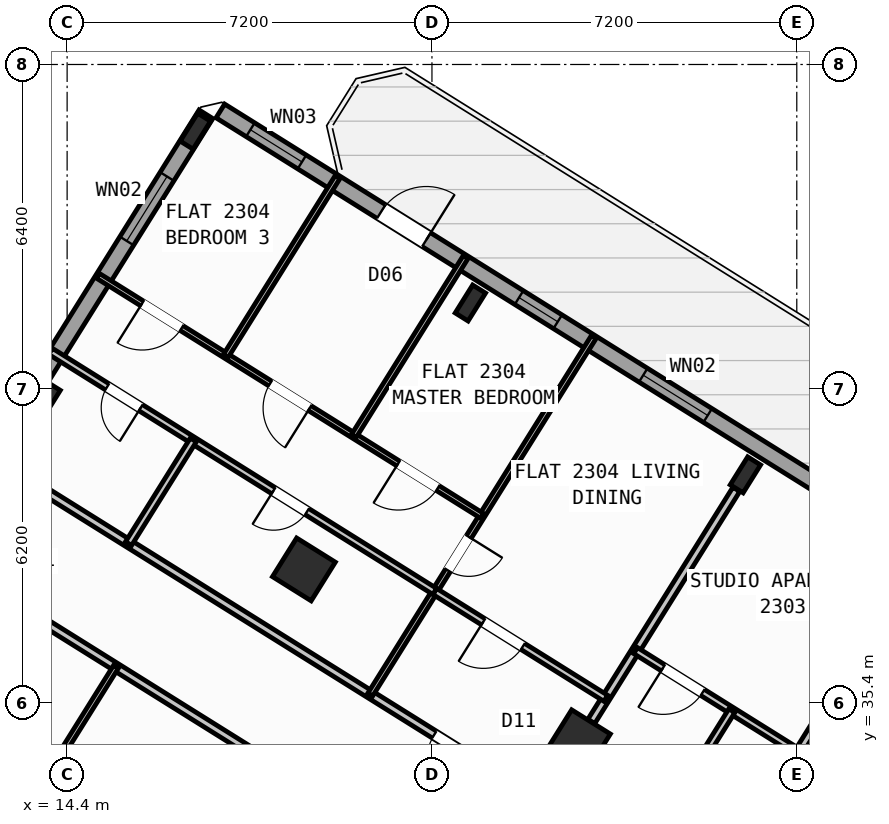
"""IFC4 building model, lengths in metres.
Left out: names, types, materials, properties, quantities, classifications, styles, units other than length and angle.
Written with IfcOpenShell. Run it as: python <this file> out.ifc"""

import sys

from ifc_helpers import new_model, si_unit, direction, frame, frame_2d, origin, origin_2d, place, context, subcontext, project, spatial, rectangle, hollow_rectangle, i_section, extrude, source, transform, mapped, element, fill, save


model = new_model("IFC4")
c1 = context("Model", 3, precision=1e-05, world=origin(), true_north=direction((0.0, 1.0)))
c2 = subcontext(c1, "Body", "Model", "MODEL_VIEW")
j1 = project(units=[si_unit("LENGTHUNIT", "METRE"), si_unit("PLANEANGLEUNIT", "RADIAN")], contexts=[c1])
p1 = place(None, origin())
s1 = spatial("IfcSite", under=j1, at=p1, CompositionType="ELEMENT")
p2 = place(p1, origin())
s2 = spatial("IfcBuilding", under=s1, at=p2, CompositionType="ELEMENT")
p3 = place(p2, frame((0.0, 0.0, 93.6)))
s3 = spatial("IfcBuildingStorey", under=s2, at=p3, CompositionType="ELEMENT", Elevation=93.6)
m1 = source(origin(), c2, "Body", "SweptSolid", [
    extrude(i_section(OverallWidth=0.3, OverallDepth=0.65, WebThickness=0.016, FlangeThickness=0.031, at=origin_2d()), origin(), (0.0, 0.0, 1.0), 3.6),
])
p4 = place(p3, frame((27.786, 39.901, 0.0), z_axis=(0.0, 0.0, 1.0), x_axis=(-0.848048096156, 0.529919264233, 0.0)))
e1 = element("IfcColumn", 1, at=p4, inside=s3, PredefinedType="COLUMN", context=c2, shape_type="MappedRepresentation", body=[
    mapped(m1, transform((0.0, 0.0, 0.0), scale=1.0)),
])
m2 = source(origin(), c2, "Body", "SweptSolid", [
    extrude(hollow_rectangle(XDim=0.9, YDim=0.9, WallThickness=0.036, at=origin_2d()), origin(), (0.0, 0.0, 1.0), 3.6),
])
p5 = place(p3, frame((24.5, 34.643, 0.0), z_axis=(0.0, 0.0, 1.0), x_axis=(-0.848048096156, 0.529919264233, 0.0)))
e2 = element("IfcColumn", 2, at=p5, inside=s3, PredefinedType="COLUMN", context=c2, shape_type="MappedRepresentation", body=[
    mapped(m2, transform((0.0, 0.0, 0.0), scale=1.0)),
])
p6 = place(p3, frame((22.358, 43.292, 0.0), z_axis=(0.0, 0.0, 1.0), x_axis=(-0.848048096156, 0.529919264233, 0.0)))
e3 = element("IfcColumn", 3, at=p6, inside=s3, PredefinedType="COLUMN", context=c2, shape_type="MappedRepresentation", body=[
    mapped(m1, transform((0.0, 0.0, 0.0), scale=1.0)),
])
p7 = place(p3, frame((19.073, 38.034, 0.0), z_axis=(0.0, 0.0, 1.0), x_axis=(-0.848048096156, 0.529919264233, 0.0)))
e4 = element("IfcColumn", 4, at=p7, inside=s3, PredefinedType="COLUMN", context=c2, shape_type="MappedRepresentation", body=[
    mapped(m2, transform((0.0, 0.0, 0.0), scale=1.0)),
])
p8 = place(p3, frame((16.931, 46.684, 0.0), z_axis=(0.0, 0.0, 1.0), x_axis=(-0.848048096156, 0.529919264233, 0.0)))
e5 = element("IfcColumn", 5, at=p8, inside=s3, PredefinedType="COLUMN", context=c2, shape_type="MappedRepresentation", body=[
    mapped(m1, transform((0.0, 0.0, 0.0), scale=1.0)),
])
p9 = place(p3, frame((13.646, 41.426, 0.0), z_axis=(0.0, 0.0, 1.0), x_axis=(-0.848048096156, 0.529919264233, 0.0)))
e6 = element("IfcColumn", 6, at=p9, inside=s3, PredefinedType="COLUMN", context=c2, shape_type="MappedRepresentation", body=[
    mapped(m2, transform((0.0, 0.0, 0.0), scale=1.0)),
])
p10 = place(p3, frame((5.7, 28.71, 0.0), z_axis=(0.0, 0.0, 1.0), x_axis=(0.529923711467, 0.8480453172, 0.0)))
e7 = element("IfcWall", 7, at=p10, inside=s3, PredefinedType="STANDARD", context=c2, shape_type="SweptSolid", body=[
    extrude(rectangle(XDim=21.587, YDim=0.32, at=frame_2d((10.794, 0.0))), origin(), (0.0, 0.0, 1.0), 2.775),
])
p11 = place(p10, frame((2.994, 0.0, 0.8)))
e8 = element("IfcOpeningElement", 8, at=p11, cuts=e7, PredefinedType="OPENING", context=c2, shape_type="SweptSolid", body=[
    extrude(rectangle(XDim=2.1, YDim=1.55, at=frame_2d((1.05, 0.775))), frame((0.0, 0.17, 0.0), z_axis=(0.0, -1.0, 0.0), x_axis=(1.0, 0.0, 0.0)), (0.0, 0.0, 1.0), 0.34),
])
p12 = place(p10, frame((9.739, 0.0, 1.0)))
e9 = element("IfcOpeningElement", 9, at=p12, cuts=e7, PredefinedType="OPENING", context=c2, shape_type="SweptSolid", body=[
    extrude(rectangle(XDim=0.9, YDim=1.25, at=frame_2d((0.45, 0.625))), frame((0.0, 0.17, 0.0), z_axis=(0.0, -1.0, 0.0), x_axis=(1.0, 0.0, 0.0)), (0.0, 0.0, 1.0), 0.34),
])
p13 = place(p10, frame((18.639, 0.0, 0.85)))
e10 = element("IfcOpeningElement", 10, at=p13, cuts=e7, PredefinedType="OPENING", context=c2, shape_type="SweptSolid", body=[
    extrude(rectangle(XDim=1.5, YDim=1.5, at=frame_2d((0.75, 0.75))), frame((0.0, 0.17, 0.0), z_axis=(0.0, -1.0, 0.0), x_axis=(1.0, 0.0, 0.0)), (0.0, 0.0, 1.0), 0.34),
])
p14 = place(p3, frame((17.424, 47.083, 0.0), z_axis=(0.0, 0.0, 1.0), x_axis=(0.848049927979, -0.529916332693, 0.0)))
e11 = element("IfcWall", 11, at=p14, inside=s3, PredefinedType="STANDARD", context=c2, shape_type="SweptSolid", body=[
    extrude(rectangle(XDim=29.223, YDim=0.32, at=frame_2d((14.612, 0.0))), origin(), (0.0, 0.0, 1.0), 3.35),
])
p15 = place(p14, frame((3.745, 0.0, 0.0)))
e12 = element("IfcOpeningElement", 12, at=p15, cuts=e11, PredefinedType="OPENING", context=c2, shape_type="SweptSolid", body=[
    extrude(rectangle(XDim=1.05, YDim=2.15, at=frame_2d((0.525, 1.075))), frame((0.0, 0.17, 0.0), z_axis=(0.0, -1.0, 0.0), x_axis=(1.0, 0.0, 0.0)), (0.0, 0.0, 1.0), 0.34),
])
p16 = place(p14, frame((0.699, 0.0, 0.95)))
e13 = element("IfcOpeningElement", 13, at=p16, cuts=e11, PredefinedType="OPENING", context=c2, shape_type="SweptSolid", body=[
    extrude(rectangle(XDim=1.2, YDim=1.4, at=frame_2d((0.6, 0.7))), frame((0.0, 0.17, 0.0), z_axis=(0.0, -1.0, 0.0), x_axis=(1.0, 0.0, 0.0)), (0.0, 0.0, 1.0), 0.34),
])
p17 = place(p14, frame((6.951, 0.0, 1.0)))
e14 = element("IfcOpeningElement", 14, at=p17, cuts=e11, PredefinedType="OPENING", context=c2, shape_type="SweptSolid", body=[
    extrude(rectangle(XDim=0.9, YDim=1.25, at=frame_2d((0.45, 0.625))), frame((0.0, 0.17, 0.0), z_axis=(0.0, -1.0, 0.0), x_axis=(1.0, 0.0, 0.0)), (0.0, 0.0, 1.0), 0.34),
])
p18 = place(p14, frame((9.841, 0.0, 0.85)))
e15 = element("IfcOpeningElement", 15, at=p18, cuts=e11, PredefinedType="OPENING", context=c2, shape_type="SweptSolid", body=[
    extrude(rectangle(XDim=1.5, YDim=1.5, at=frame_2d((0.75, 0.75))), frame((0.0, 0.17, 0.0), z_axis=(0.0, -1.0, 0.0), x_axis=(1.0, 0.0, 0.0)), (0.0, 0.0, 1.0), 0.34),
])
p19 = place(p14, frame((13.889, 0.0, 0.95)))
e16 = element("IfcOpeningElement", 16, at=p19, cuts=e11, PredefinedType="OPENING", context=c2, shape_type="SweptSolid", body=[
    extrude(rectangle(XDim=1.2, YDim=1.4, at=frame_2d((0.6, 0.7))), frame((0.0, 0.17, 0.0), z_axis=(0.0, -1.0, 0.0), x_axis=(1.0, 0.0, 0.0)), (0.0, 0.0, 1.0), 0.34),
])
p20 = place(p14, frame((17.254, 0.0, 1.0)))
e17 = element("IfcOpeningElement", 17, at=p20, cuts=e11, PredefinedType="OPENING", context=c2, shape_type="SweptSolid", body=[
    extrude(rectangle(XDim=0.9, YDim=1.25, at=frame_2d((0.45, 0.625))), frame((0.0, 0.17, 0.0), z_axis=(0.0, -1.0, 0.0), x_axis=(1.0, 0.0, 0.0)), (0.0, 0.0, 1.0), 0.34),
])
p21 = place(p14, frame((20.764, 0.0, 0.8)))
e18 = element("IfcOpeningElement", 18, at=p21, cuts=e11, PredefinedType="OPENING", context=c2, shape_type="SweptSolid", body=[
    extrude(rectangle(XDim=2.1, YDim=1.55, at=frame_2d((1.05, 0.775))), frame((0.0, 0.17, 0.0), z_axis=(0.0, -1.0, 0.0), x_axis=(1.0, 0.0, 0.0)), (0.0, 0.0, 1.0), 0.34),
])
p22 = place(p14, frame((25.403, 0.0, 0.8)))
e19 = element("IfcOpeningElement", 19, at=p22, cuts=e11, PredefinedType="OPENING", context=c2, shape_type="SweptSolid", body=[
    extrude(rectangle(XDim=2.1, YDim=1.55, at=frame_2d((1.05, 0.775))), frame((0.0, 0.17, 0.0), z_axis=(0.0, -1.0, 0.0), x_axis=(1.0, 0.0, 0.0)), (0.0, 0.0, 1.0), 0.34),
])
p23 = place(p3, frame((31.239, 38.274, 0.0), z_axis=(0.0, 0.0, 1.0), x_axis=(-0.529928058306, -0.848042600947, 0.0)))
e20 = element("IfcWall", 20, at=p23, inside=s3, PredefinedType="PARTITIONING", context=c2, shape_type="SweptSolid", body=[
    extrude(rectangle(XDim=8.05, YDim=0.16, at=frame_2d((4.025, 0.0))), origin(), (0.0, 0.0, 1.0), 3.34),
])
p24 = place(p3, frame((26.973, 31.447, 0.0), z_axis=(0.0, 0.0, 1.0), x_axis=(-0.848048310262, 0.529918921593, 0.0)))
e21 = element("IfcWall", 21, at=p24, inside=s3, PredefinedType="PARTITIONING", context=c2, shape_type="SweptSolid", body=[
    extrude(rectangle(XDim=16.73, YDim=0.16, at=frame_2d((8.365, 0.0))), origin(), (0.0, 0.0, 1.0), 3.34),
])
p25 = place(p24, frame((2.22, 0.0, 0.0)))
e22 = element("IfcOpeningElement", 22, at=p25, cuts=e21, PredefinedType="OPENING", context=c2, shape_type="SweptSolid", body=[
    extrude(rectangle(XDim=0.86, YDim=2.05, at=frame_2d((0.43, 1.025))), frame((0.0, 0.09, 0.0), z_axis=(0.0, -1.0, 0.0), x_axis=(1.0, 0.0, 0.0)), (0.0, 0.0, 1.0), 0.18),
])
p26 = place(p24, frame((5.28, 0.0, 0.0)))
e23 = element("IfcOpeningElement", 23, at=p26, cuts=e21, PredefinedType="OPENING", context=c2, shape_type="SweptSolid", body=[
    extrude(rectangle(XDim=1.0, YDim=2.1, at=frame_2d((0.5, 1.05))), frame((0.0, 0.09, 0.0), z_axis=(0.0, -1.0, 0.0), x_axis=(1.0, 0.0, 0.0)), (0.0, 0.0, 1.0), 0.18),
])
p27 = place(p3, frame((25.807, 29.582, 0.0), z_axis=(0.0, 0.0, 1.0), x_axis=(-0.848052408131, 0.529912363569, 0.0)))
e24 = element("IfcWall", 24, at=p27, inside=s3, PredefinedType="PARTITIONING", context=c2, shape_type="SweptSolid", body=[
    extrude(rectangle(XDim=16.73, YDim=0.16, at=frame_2d((8.365, 0.0))), origin(), (0.0, 0.0, 1.0), 3.34),
])
p28 = place(p27, frame((2.22, 0.0, 0.0)))
e25 = element("IfcOpeningElement", 25, at=p28, cuts=e24, PredefinedType="OPENING", context=c2, shape_type="SweptSolid", body=[
    extrude(rectangle(XDim=0.86, YDim=2.05, at=frame_2d((0.43, 1.025))), frame((0.0, 0.09, 0.0), z_axis=(0.0, -1.0, 0.0), x_axis=(1.0, 0.0, 0.0)), (0.0, 0.0, 1.0), 0.18),
])
p29 = place(p27, frame((14.013, 0.0, 0.0)))
e26 = element("IfcOpeningElement", 26, at=p29, cuts=e24, PredefinedType="OPENING", context=c2, shape_type="SweptSolid", body=[
    extrude(rectangle(XDim=1.0, YDim=2.1, at=frame_2d((0.5, 1.05))), frame((0.0, 0.09, 0.0), z_axis=(0.0, -1.0, 0.0), x_axis=(1.0, 0.0, 0.0)), (0.0, 0.0, 1.0), 0.18),
])
p30 = place(p3, frame((15.361, 36.108, 0.0), z_axis=(0.0, 0.0, 1.0), x_axis=(-0.529912802348, -0.848052133956, 0.0)))
e27 = element("IfcWall", 27, at=p30, inside=s3, PredefinedType="PARTITIONING", context=c2, shape_type="SweptSolid", body=[
    extrude(rectangle(XDim=11.72, YDim=0.11, at=frame_2d((5.86, 0.0))), origin(), (0.0, 0.0, 1.0), 2.995),
])
p31 = place(p30, frame((3.0, 0.0, 0.0)))
e28 = element("IfcOpeningElement", 28, at=p31, cuts=e27, PredefinedType="OPENING", context=c2, shape_type="SweptSolid", body=[
    extrude(rectangle(XDim=0.78, YDim=2.05, at=frame_2d((0.39, 1.025))), frame((0.0, 0.065, 0.0), z_axis=(0.0, -1.0, 0.0), x_axis=(1.0, 0.0, 0.0)), (0.0, 0.0, 1.0), 0.13),
])
p32 = place(p3, frame((14.09, 34.073, 0.0), z_axis=(0.0, 0.0, 1.0), x_axis=(-0.848045135007, 0.529924003034, 0.0)))
e29 = element("IfcWall", 29, at=p32, inside=s3, PredefinedType="PLUMBINGWALL", context=c2, shape_type="SweptSolid", body=[
    extrude(rectangle(XDim=4.393, YDim=0.14, at=frame_2d((2.196, 0.0))), origin(), (0.0, 0.0, 1.0), 3.34),
])
p33 = place(p32, frame((1.737, 0.0, 0.0)))
e30 = element("IfcOpeningElement", 30, at=p33, cuts=e29, PredefinedType="OPENING", context=c2, shape_type="SweptSolid", body=[
    extrude(rectangle(XDim=0.92, YDim=2.08, at=frame_2d((0.46, 1.04))), frame((0.0, 0.08, 0.0), z_axis=(0.0, -1.0, 0.0), x_axis=(1.0, 0.0, 0.0)), (0.0, 0.0, 1.0), 0.16),
])
p34 = place(p3, frame((27.607, 39.615, 0.0), z_axis=(0.0, 0.0, 1.0), x_axis=(-0.529913610495, -0.848051628978, 0.0)))
e31 = element("IfcWall", 31, at=p34, inside=s3, PredefinedType="PARTITIONING", context=c2, shape_type="SweptSolid", body=[
    extrude(rectangle(XDim=5.401, YDim=0.16, at=frame_2d((2.7, 0.0))), origin(), (0.0, 0.0, 1.0), 2.775),
])
p35 = place(p3, frame((28.833, 34.424, 0.0), z_axis=(0.0, 0.0, 1.0), x_axis=(-0.848059820872, 0.529900500304, 0.0)))
e32 = element("IfcWall", 32, at=p35, inside=s3, PredefinedType="PLUMBINGWALL", context=c2, shape_type="SweptSolid", body=[
    extrude(rectangle(XDim=3.79, YDim=0.14, at=frame_2d((1.895, 0.0))), origin(), (0.0, 0.0, 1.0), 3.34),
])
p36 = place(p35, frame((2.23, 0.0, 0.0)))
e33 = element("IfcOpeningElement", 33, at=p36, cuts=e32, PredefinedType="OPENING", context=c2, shape_type="SweptSolid", body=[
    extrude(rectangle(XDim=0.92, YDim=2.08, at=frame_2d((0.46, 1.04))), frame((0.0, 0.08, 0.0), z_axis=(0.0, -1.0, 0.0), x_axis=(1.0, 0.0, 0.0)), (0.0, 0.0, 1.0), 0.16),
])
p37 = place(p3, frame((27.518, 35.245, 0.0), z_axis=(0.0, 0.0, 1.0), x_axis=(-0.529948921118, -0.848029563757, 0.0)))
e34 = element("IfcWall", 34, at=p37, inside=s3, PredefinedType="PLUMBINGWALL", context=c2, shape_type="SweptSolid", body=[
    extrude(rectangle(XDim=3.51, YDim=0.14, at=frame_2d((1.755, 0.0))), origin(), (0.0, 0.0, 1.0), 2.995),
])
p38 = place(p37, frame((1.365, 0.0, 0.0)))
e35 = element("IfcOpeningElement", 35, at=p38, cuts=e34, PredefinedType="OPENING", context=c2, shape_type="SweptSolid", body=[
    extrude(rectangle(XDim=0.78, YDim=2.05, at=frame_2d((0.39, 1.025))), frame((0.0, 0.08, 0.0), z_axis=(0.0, -1.0, 0.0), x_axis=(1.0, 0.0, 0.0)), (0.0, 0.0, 1.0), 0.16),
])
p39 = place(p3, frame((24.792, 42.62, 0.0), z_axis=(0.0, 0.0, 1.0), x_axis=(-0.529925083182, -0.848044460046, 0.0)))
e36 = element("IfcWall", 36, at=p39, inside=s3, PredefinedType="PARTITIONING", context=c2, shape_type="SweptSolid", body=[
    extrude(rectangle(XDim=8.32, YDim=0.11, at=frame_2d((4.16, 0.0))), origin(), (0.0, 0.0, 1.0), 3.34),
])
p40 = place(p39, frame((4.65, 0.0, 0.0)))
e37 = element("IfcOpeningElement", 37, at=p40, cuts=e36, PredefinedType="OPENING", context=c2, shape_type="SweptSolid", body=[
    extrude(rectangle(XDim=0.78, YDim=2.05, at=frame_2d((0.39, 1.025))), frame((0.0, 0.065, 0.0), z_axis=(0.0, -1.0, 0.0), x_axis=(1.0, 0.0, 0.0)), (0.0, 0.0, 1.0), 0.13),
])
p41 = place(p3, frame((25.03, 35.491, 0.0), z_axis=(0.0, 0.0, 1.0), x_axis=(-0.848070667369, 0.52988314103, 0.0)))
e38 = element("IfcWall", 38, at=p41, inside=s3, PredefinedType="PLUMBINGWALL", context=c2, shape_type="SweptSolid", body=[
    extrude(rectangle(XDim=3.98, YDim=0.14, at=frame_2d((1.99, 0.0))), origin(), (0.0, 0.0, 1.0), 3.34),
])
p42 = place(p41, frame((1.93, 0.0, 0.0)))
e39 = element("IfcOpeningElement", 39, at=p42, cuts=e38, PredefinedType="OPENING", context=c2, shape_type="SweptSolid", body=[
    extrude(rectangle(XDim=0.92, YDim=2.08, at=frame_2d((0.46, 1.04))), frame((0.0, 0.08, 0.0), z_axis=(0.0, -1.0, 0.0), x_axis=(1.0, 0.0, 0.0)), (0.0, 0.0, 1.0), 0.16),
])
p43 = place(p3, frame((21.655, 37.6, 0.0), z_axis=(0.0, 0.0, 1.0), x_axis=(-0.848044326704, 0.52992529657, 0.0)))
e40 = element("IfcWall", 40, at=p43, inside=s3, PredefinedType="PLUMBINGWALL", context=c2, shape_type="SweptSolid", body=[
    extrude(rectangle(XDim=8.94, YDim=0.14, at=frame_2d((4.47, 0.0))), origin(), (0.0, 0.0, 1.0), 3.34),
])
p44 = place(p43, frame((2.972, 0.0, 0.0)))
e41 = element("IfcOpeningElement", 41, at=p44, cuts=e40, PredefinedType="OPENING", context=c2, shape_type="SweptSolid", body=[
    extrude(rectangle(XDim=0.78, YDim=2.05, at=frame_2d((0.39, 1.025))), frame((0.0, 0.08, 0.0), z_axis=(0.0, -1.0, 0.0), x_axis=(1.0, 0.0, 0.0)), (0.0, 0.0, 1.0), 0.16),
])
p45 = place(p43, frame((6.843, 0.0, 0.0)))
e42 = element("IfcOpeningElement", 42, at=p45, cuts=e40, PredefinedType="OPENING", context=c2, shape_type="SweptSolid", body=[
    extrude(rectangle(XDim=0.78, YDim=2.05, at=frame_2d((0.39, 1.025))), frame((0.0, 0.08, 0.0), z_axis=(0.0, -1.0, 0.0), x_axis=(1.0, 0.0, 0.0)), (0.0, 0.0, 1.0), 0.16),
])
p46 = place(p3, frame((16.89, 40.589, 0.0), z_axis=(0.0, 0.0, 1.0), x_axis=(-0.52988967038, -0.848066587731, 0.0)))
e43 = element("IfcWall", 43, at=p46, inside=s3, PredefinedType="PLUMBINGWALL", context=c2, shape_type="SweptSolid", body=[
    extrude(rectangle(XDim=2.41, YDim=0.14, at=frame_2d((1.205, 0.0))), origin(), (0.0, 0.0, 1.0), 3.34),
])
p47 = place(p3, frame((22.588, 39.093, 0.0), z_axis=(0.0, 0.0, 1.0), x_axis=(-0.848044326704, 0.52992529657, 0.0)))
e44 = element("IfcWall", 44, at=p47, inside=s3, PredefinedType="PARTITIONING", context=c2, shape_type="SweptSolid", body=[
    extrude(rectangle(XDim=8.94, YDim=0.11, at=frame_2d((4.47, 0.0))), origin(), (0.0, 0.0, 1.0), 3.34),
])
p48 = place(p47, frame((1.03, 0.0, 0.0)))
e45 = element("IfcOpeningElement", 45, at=p48, cuts=e44, PredefinedType="OPENING", context=c2, shape_type="SweptSolid", body=[
    extrude(rectangle(XDim=0.92, YDim=2.08, at=frame_2d((0.46, 1.04))), frame((0.0, 0.065, 0.0), z_axis=(0.0, -1.0, 0.0), x_axis=(1.0, 0.0, 0.0)), (0.0, 0.0, 1.0), 0.13),
])
p49 = place(p47, frame((4.01, 0.0, 0.0)))
e46 = element("IfcOpeningElement", 46, at=p49, cuts=e44, PredefinedType="OPENING", context=c2, shape_type="SweptSolid", body=[
    extrude(rectangle(XDim=0.92, YDim=2.08, at=frame_2d((0.46, 1.04))), frame((0.0, 0.065, 0.0), z_axis=(0.0, -1.0, 0.0), x_axis=(1.0, 0.0, 0.0)), (0.0, 0.0, 1.0), 0.13),
])
p50 = place(p47, frame((6.99, 0.0, 0.0)))
e47 = element("IfcOpeningElement", 47, at=p50, cuts=e44, PredefinedType="OPENING", context=c2, shape_type="SweptSolid", body=[
    extrude(rectangle(XDim=0.92, YDim=2.08, at=frame_2d((0.46, 1.04))), frame((0.0, 0.065, 0.0), z_axis=(0.0, -1.0, 0.0), x_axis=(1.0, 0.0, 0.0)), (0.0, 0.0, 1.0), 0.13),
])
p51 = place(p3, frame((22.265, 44.199, 0.0), z_axis=(0.0, 0.0, 1.0), x_axis=(-0.529946186362, -0.848031272749, 0.0)))
e48 = element("IfcWall", 48, at=p51, inside=s3, PredefinedType="PARTITIONING", context=c2, shape_type="SweptSolid", body=[
    extrude(rectangle(XDim=4.16, YDim=0.11, at=frame_2d((2.08, 0.0))), origin(), (0.0, 0.0, 1.0), 3.34),
])
p52 = place(p3, frame((19.738, 45.779, 0.0), z_axis=(0.0, 0.0, 1.0), x_axis=(-0.529877605827, -0.848074125795, 0.0)))
e49 = element("IfcWall", 49, at=p52, inside=s3, PredefinedType="PARTITIONING", context=c2, shape_type="SweptSolid", body=[
    extrude(rectangle(XDim=4.16, YDim=0.11, at=frame_2d((2.08, 0.0))), origin(), (0.0, 0.0, 1.0), 3.34),
])
m3 = source(origin(), c2, "Body", "SweptSolid", [
    extrude(rectangle(XDim=1.05, YDim=2.15, at=frame_2d((0.525, 1.075))), frame((0.0, 0.025, 0.0), z_axis=(0.0, -1.0, 0.0), x_axis=(1.0, 0.0, 0.0)), (0.0, 0.0, 1.0), 0.05),
])
p53 = place(p15, origin())
e50 = element("IfcDoor", 50, at=p53, inside=s3, OperationType="SINGLE_SWING_RIGHT", PredefinedType="DOOR", context=c2, shape_type="MappedRepresentation", body=[
    mapped(m3, transform((0.0, 0.0, 0.0), scale=1.0)),
])
fill(e12, e50)
m4 = source(origin(), c2, "Body", "SweptSolid", [
    extrude(rectangle(XDim=1.5, YDim=1.5, at=frame_2d((0.75, 0.75))), frame((0.0, 0.03, 0.0), z_axis=(0.0, -1.0, 0.0), x_axis=(1.0, 0.0, 0.0)), (0.0, 0.0, 1.0), 0.06),
])
p54 = place(p13, origin())
e51 = element("IfcWindow", 51, at=p54, inside=s3, PartitioningType="SINGLE_PANEL", PredefinedType="WINDOW", context=c2, shape_type="MappedRepresentation", body=[
    mapped(m4, transform((0.0, 0.0, 0.0), scale=1.0)),
])
fill(e10, e51)
m5 = source(origin(), c2, "Body", "SweptSolid", [
    extrude(rectangle(XDim=1.2, YDim=1.4, at=frame_2d((0.6, 0.7))), frame((0.0, 0.03, 0.0), z_axis=(0.0, -1.0, 0.0), x_axis=(1.0, 0.0, 0.0)), (0.0, 0.0, 1.0), 0.06),
])
p55 = place(p16, origin())
e52 = element("IfcWindow", 52, at=p55, inside=s3, PartitioningType="SINGLE_PANEL", PredefinedType="WINDOW", context=c2, shape_type="MappedRepresentation", body=[
    mapped(m5, transform((0.0, 0.0, 0.0), scale=1.0)),
])
fill(e13, e52)
m6 = source(origin(), c2, "Body", "SweptSolid", [
    extrude(rectangle(XDim=0.9, YDim=1.25, at=frame_2d((0.45, 0.625))), frame((0.0, 0.03, 0.0), z_axis=(0.0, -1.0, 0.0), x_axis=(1.0, 0.0, 0.0)), (0.0, 0.0, 1.0), 0.06),
])
p56 = place(p17, origin())
e53 = element("IfcWindow", 53, at=p56, inside=s3, PartitioningType="SINGLE_PANEL", PredefinedType="WINDOW", context=c2, shape_type="MappedRepresentation", body=[
    mapped(m6, transform((0.0, 0.0, 0.0), scale=1.0)),
])
fill(e14, e53)
p57 = place(p18, origin())
e54 = element("IfcWindow", 54, at=p57, inside=s3, PartitioningType="SINGLE_PANEL", PredefinedType="WINDOW", context=c2, shape_type="MappedRepresentation", body=[
    mapped(m4, transform((0.0, 0.0, 0.0), scale=1.0)),
])
fill(e15, e54)
m7 = source(origin(), c2, "Body", "SweptSolid", [
    extrude(rectangle(XDim=0.92, YDim=2.08, at=frame_2d((0.46, 1.04))), frame((0.0, 0.025, 0.0), z_axis=(0.0, -1.0, 0.0), x_axis=(1.0, 0.0, 0.0)), (0.0, 0.0, 1.0), 0.05),
])
p58 = place(p36, origin())
e55 = element("IfcDoor", 55, at=p58, inside=s3, OperationType="SINGLE_SWING_RIGHT", PredefinedType="DOOR", context=c2, shape_type="MappedRepresentation", body=[
    mapped(m7, transform((0.0, 0.0, 0.0), scale=1.0)),
])
fill(e33, e55)
m8 = source(origin(), c2, "Body", "SweptSolid", [
    extrude(rectangle(XDim=1.0, YDim=2.1, at=frame_2d((0.5, 1.05))), frame((0.0, 0.025, 0.0), z_axis=(0.0, -1.0, 0.0), x_axis=(1.0, 0.0, 0.0)), (0.0, 0.0, 1.0), 0.05),
])
p59 = place(p26, origin())
e56 = element("IfcDoor", 56, at=p59, inside=s3, OperationType="SINGLE_SWING_LEFT", PredefinedType="DOOR", context=c2, shape_type="MappedRepresentation", body=[
    mapped(m8, transform((0.0, 0.0, 0.0), scale=1.0)),
])
fill(e23, e56)
p60 = place(p42, origin())
e57 = element("IfcDoor", 57, at=p60, inside=s3, OperationType="SINGLE_SWING_RIGHT", PredefinedType="DOOR", context=c2, shape_type="MappedRepresentation", body=[
    mapped(m7, transform((0.0, 0.0, 0.0), scale=1.0)),
])
fill(e39, e57)
m9 = source(origin(), c2, "Body", "SweptSolid", [
    extrude(rectangle(XDim=0.78, YDim=2.05, at=frame_2d((0.39, 1.025))), frame((0.0, 0.025, 0.0), z_axis=(0.0, -1.0, 0.0), x_axis=(1.0, 0.0, 0.0)), (0.0, 0.0, 1.0), 0.05),
])
p61 = place(p40, origin())
e58 = element("IfcDoor", 58, at=p61, inside=s3, OperationType="SINGLE_SWING_LEFT", PredefinedType="DOOR", context=c2, shape_type="MappedRepresentation", body=[
    mapped(m9, transform((0.0, 0.0, 0.0), scale=1.0)),
])
fill(e37, e58)
p62 = place(p44, origin())
e59 = element("IfcDoor", 59, at=p62, inside=s3, OperationType="SINGLE_SWING_RIGHT", PredefinedType="DOOR", context=c2, shape_type="MappedRepresentation", body=[
    mapped(m9, transform((0.0, 0.0, 0.0), scale=1.0)),
])
fill(e41, e59)
p63 = place(p45, origin())
e60 = element("IfcDoor", 60, at=p63, inside=s3, OperationType="SINGLE_SWING_LEFT", PredefinedType="DOOR", context=c2, shape_type="MappedRepresentation", body=[
    mapped(m9, transform((0.0, 0.0, 0.0), scale=1.0)),
])
fill(e42, e60)
p64 = place(p48, origin())
e61 = element("IfcDoor", 61, at=p64, inside=s3, OperationType="SINGLE_SWING_RIGHT", PredefinedType="DOOR", context=c2, shape_type="MappedRepresentation", body=[
    mapped(m7, transform((0.0, 0.0, 0.0), scale=1.0)),
])
fill(e45, e61)
p65 = place(p49, origin())
e62 = element("IfcDoor", 62, at=p65, inside=s3, OperationType="SINGLE_SWING_LEFT", PredefinedType="DOOR", context=c2, shape_type="MappedRepresentation", body=[
    mapped(m7, transform((0.0, 0.0, 0.0), scale=1.0)),
])
fill(e46, e62)
p66 = place(p50, origin())
e63 = element("IfcDoor", 63, at=p66, inside=s3, OperationType="SINGLE_SWING_RIGHT", PredefinedType="DOOR", context=c2, shape_type="MappedRepresentation", body=[
    mapped(m7, transform((0.0, 0.0, 0.0), scale=1.0)),
])
fill(e47, e63)
save(model, sys.argv[1])
